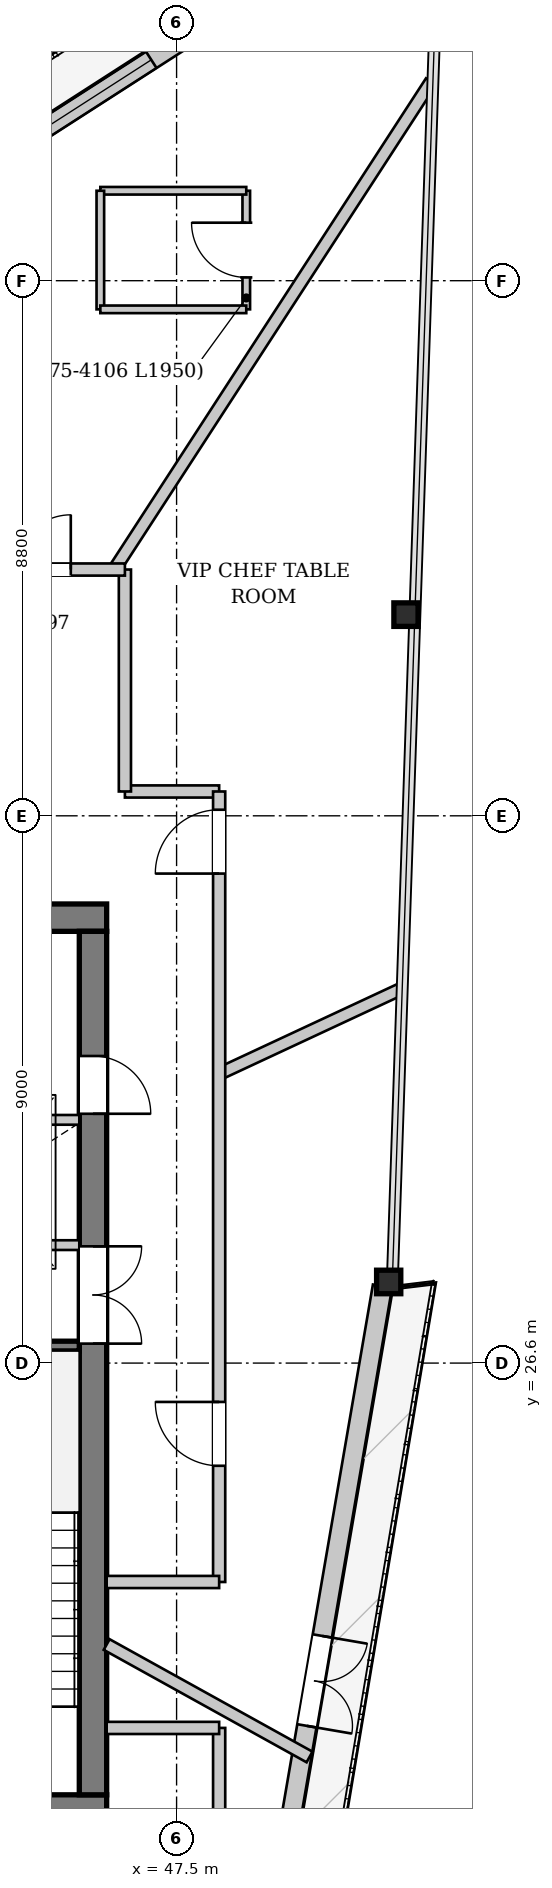
"""IFC4 building model, lengths in metres.
Left out: names, types, materials, properties, quantities, classifications, styles, units other than length and angle.
Written with IfcOpenShell. Run it as: python <this file> out.ifc"""

import sys

from ifc_helpers import new_model, si_unit, direction, frame, frame_2d, origin, origin_2d, place, context, subcontext, project, spatial, rectangle, i_section, extrude, source, transform, mapped, element, fill, save


model = new_model("IFC4")
c1 = context("Model", 3, precision=1e-05, world=origin(), true_north=direction((0.0, 1.0)))
c2 = subcontext(c1, "Body", "Model", "MODEL_VIEW")
j1 = project(units=[si_unit("LENGTHUNIT", "METRE"), si_unit("PLANEANGLEUNIT", "RADIAN")], contexts=[c1])
p1 = place(None, origin())
s1 = spatial("IfcSite", under=j1, at=p1, CompositionType="ELEMENT")
p2 = place(p1, origin())
s2 = spatial("IfcBuilding", under=s1, at=p2, CompositionType="ELEMENT")
p3 = place(p2, frame((0.0, 0.0, 281.9)))
s3 = spatial("IfcBuildingStorey", under=s2, at=p3, CompositionType="ELEMENT", Elevation=281.9)
m1 = source(origin(), c2, "Body", "SweptSolid", [
    extrude(i_section(OverallWidth=0.398, OverallDepth=0.387, WebThickness=0.019, FlangeThickness=0.029, at=origin_2d()), origin(), (0.0, 0.0, 1.0), 3.941),
])
p4 = place(p3, frame((51.044, 27.838, 0.0), z_axis=(-0.028432007479, 0.048811376674, 0.99840326044), x_axis=(-0.864096904342, -0.503325481082, 0.0)))
e1 = element("IfcColumn", 1, at=p4, inside=s3, PredefinedType="COLUMN", context=c2, shape_type="MappedRepresentation", body=[
    mapped(m1, transform((0.0, 0.0, 0.0), x_axis=(1.0, 0.0, 0.0), y_axis=(0.0, 1.0, 0.0), z_axis=(0.0, 0.0, 1.0), scale=1.0)),
])
m2 = source(origin(), c2, "Body", "SweptSolid", [
    extrude(i_section(OverallWidth=0.398, OverallDepth=0.387, WebThickness=0.019, FlangeThickness=0.029, at=origin_2d()), origin(), (0.0, 0.0, 1.0), 3.949),
])
p5 = place(p3, frame((51.417, 38.826, 0.0), z_axis=(-0.072828075966, 0.041730858469, 0.996471076752), x_axis=(-0.497169755353, -0.867653291564, 0.0)))
e2 = element("IfcColumn", 2, at=p5, inside=s3, PredefinedType="COLUMN", context=c2, shape_type="MappedRepresentation", body=[
    mapped(m2, transform((0.0, 0.0, 0.0), x_axis=(1.0, 0.0, 0.0), y_axis=(0.0, 1.0, 0.0), z_axis=(0.0, 0.0, 1.0), scale=1.0)),
])
p6 = place(p3, frame((50.887, 27.865, 0.0), z_axis=(0.0, 0.0, 1.0), x_axis=(-0.169551460744, -0.985521335213, 0.0)))
e3 = element("IfcWall", 3, at=p6, inside=s3, PredefinedType="SOLIDWALL", context=c2, shape_type="SweptSolid", body=[
    extrude(rectangle(XDim=21.989, YDim=0.32, at=frame_2d((10.995, 0.0))), origin(), (0.0, 0.0, 1.0), 3.462),
])
p7 = place(p6, frame((5.837, 0.0, 0.0)))
e4 = element("IfcOpeningElement", 4, at=p7, cuts=e3, PredefinedType="OPENING", context=c2, shape_type="SweptSolid", body=[
    extrude(rectangle(XDim=1.5, YDim=2.3, at=frame_2d((0.75, 1.15))), frame((0.0, 0.17, 0.0), z_axis=(0.0, -1.0, 0.0), x_axis=(1.0, 0.0, 0.0)), (0.0, 0.0, 1.0), 0.34),
])
p8 = place(p6, frame((14.972, 0.0, 0.65)))
e5 = element("IfcOpeningElement", 5, at=p8, cuts=e3, PredefinedType="OPENING", context=c2, shape_type="SweptSolid", body=[
    extrude(rectangle(XDim=2.6, YDim=2.35, at=frame_2d((1.3, 1.175))), frame((0.0, 0.17, 0.0), z_axis=(0.0, -1.0, 0.0), x_axis=(1.0, 0.0, 0.0)), (0.0, 0.0, 1.0), 0.34),
])
p9 = place(p3, frame((32.617, 38.727, 0.0), z_axis=(0.0, 0.0, 1.0), x_axis=(0.841031155516, 0.540986686944, 0.0)))
e6 = element("IfcWall", 6, at=p9, inside=s3, PredefinedType="SOLIDWALL", context=c2, shape_type="SweptSolid", body=[
    extrude(rectangle(XDim=21.489, YDim=0.32, at=frame_2d((10.744, 0.0))), origin(), (0.0, 0.0, 1.0), 3.462),
])
p10 = place(p9, frame((6.876, 0.0, 0.0)))
e7 = element("IfcOpeningElement", 7, at=p10, cuts=e6, PredefinedType="OPENING", context=c2, shape_type="SweptSolid", body=[
    extrude(rectangle(XDim=1.5, YDim=2.3, at=frame_2d((0.75, 1.15))), frame((0.0, 0.17, 0.0), z_axis=(0.0, -1.0, 0.0), x_axis=(1.0, 0.0, 0.0)), (0.0, 0.0, 1.0), 0.34),
])
p11 = place(p9, frame((14.601, 0.0, 0.65)))
e8 = element("IfcOpeningElement", 8, at=p11, cuts=e6, PredefinedType="OPENING", context=c2, shape_type="SweptSolid", body=[
    extrude(rectangle(XDim=2.6, YDim=2.35, at=frame_2d((1.3, 1.175))), frame((0.0, 0.17, 0.0), z_axis=(0.0, -1.0, 0.0), x_axis=(1.0, 0.0, 0.0)), (0.0, 0.0, 1.0), 0.34),
])
p12 = place(p3, frame((46.35, 19.275, 0.0), z_axis=(0.0, 0.0, 1.0), x_axis=(-1.0, 0.0, 0.0)))
e9 = element("IfcWall", 9, at=p12, inside=s3, PredefinedType="SHEAR", context=c2, shape_type="SweptSolid", body=[
    extrude(rectangle(XDim=16.7, YDim=0.45, at=frame_2d((8.35, 0.0))), origin(), (0.0, 0.0, 1.0), 3.92),
])
p13 = place(p12, frame((4.55, 0.0, 0.0)))
e10 = element("IfcOpeningElement", 10, at=p13, cuts=e9, PredefinedType="OPENING", context=c2, shape_type="SweptSolid", body=[
    extrude(rectangle(XDim=1.12, YDim=2.25, at=frame_2d((0.56, 1.125))), frame((0.0, 0.235, 0.0), z_axis=(0.0, -1.0, 0.0), x_axis=(1.0, 0.0, 0.0)), (0.0, 0.0, 1.0), 0.47),
])
p14 = place(p12, frame((11.05, 0.0, 0.0)))
e11 = element("IfcOpeningElement", 11, at=p14, cuts=e9, PredefinedType="OPENING", context=c2, shape_type="SweptSolid", body=[
    extrude(rectangle(XDim=1.12, YDim=2.25, at=frame_2d((0.56, 1.125))), frame((0.0, 0.235, 0.0), z_axis=(0.0, -1.0, 0.0), x_axis=(1.0, 0.0, 0.0)), (0.0, 0.0, 1.0), 0.47),
])
p15 = place(p3, frame((29.65, 33.925, 0.0), z_axis=(0.0, 0.0, 1.0), x_axis=(1.0, 0.0, 0.0)))
e12 = element("IfcWall", 12, at=p15, inside=s3, PredefinedType="SHEAR", context=c2, shape_type="SweptSolid", body=[
    extrude(rectangle(XDim=16.7, YDim=0.45, at=frame_2d((8.35, 0.0))), origin(), (0.0, 0.0, 1.0), 3.92),
])
p16 = place(p15, frame((1.45, 0.0, 0.0)))
e13 = element("IfcOpeningElement", 13, at=p16, cuts=e12, PredefinedType="OPENING", context=c2, shape_type="SweptSolid", body=[
    extrude(rectangle(XDim=0.95, YDim=2.1, at=frame_2d((0.475, 1.05))), frame((0.0, 0.235, 0.0), z_axis=(0.0, -1.0, 0.0), x_axis=(1.0, 0.0, 0.0)), (0.0, 0.0, 1.0), 0.47),
])
p17 = place(p15, frame((3.83, 0.0, 0.0)))
e14 = element("IfcOpeningElement", 14, at=p17, cuts=e12, PredefinedType="OPENING", context=c2, shape_type="SweptSolid", body=[
    extrude(rectangle(XDim=1.32, YDim=2.2, at=frame_2d((0.66, 1.1))), frame((0.0, 0.235, 0.0), z_axis=(0.0, -1.0, 0.0), x_axis=(1.0, 0.0, 0.0)), (0.0, 0.0, 1.0), 0.47),
])
p18 = place(p3, frame((46.125, 33.7, 0.0), z_axis=(0.0, 0.0, 1.0), x_axis=(0.0, -1.0, 0.0)))
e15 = element("IfcWall", 15, at=p18, inside=s3, PredefinedType="SHEAR", context=c2, shape_type="SweptSolid", body=[
    extrude(rectangle(XDim=14.2, YDim=0.45, at=frame_2d((7.1, 0.0))), origin(), (0.0, 0.0, 1.0), 3.92),
])
p19 = place(p18, frame((5.18, 0.0, 0.0)))
e16 = element("IfcOpeningElement", 16, at=p19, cuts=e15, PredefinedType="OPENING", context=c2, shape_type="SweptSolid", body=[
    extrude(rectangle(XDim=1.6, YDim=2.2, at=frame_2d((0.8, 1.1))), frame((0.0, 0.235, 0.0), z_axis=(0.0, -1.0, 0.0), x_axis=(1.0, 0.0, 0.0)), (0.0, 0.0, 1.0), 0.47),
])
p20 = place(p18, frame((2.05, 0.0, 0.0)))
e17 = element("IfcOpeningElement", 17, at=p20, cuts=e15, PredefinedType="OPENING", context=c2, shape_type="SweptSolid", body=[
    extrude(rectangle(XDim=0.95, YDim=2.1, at=frame_2d((0.475, 1.05))), frame((0.0, 0.235, 0.0), z_axis=(0.0, -1.0, 0.0), x_axis=(1.0, 0.0, 0.0)), (0.0, 0.0, 1.0), 0.47),
])
p21 = place(p3, frame((42.88, 26.88, 0.0), z_axis=(0.0, 0.0, 1.0), x_axis=(1.0, 0.0, 0.0)))
e18 = element("IfcWall", 18, at=p21, inside=s3, PredefinedType="PARTITIONING", context=c2, shape_type="SweptSolid", body=[
    extrude(rectangle(XDim=3.02, YDim=0.16, at=frame_2d((1.51, 0.0))), origin(), (0.0, 0.0, 1.0), 3.92),
])
p22 = place(p3, frame((33.28, 28.54, 0.0), z_axis=(0.0, 0.0, 1.0), x_axis=(1.0, 0.0, 0.0)))
e19 = element("IfcWall", 19, at=p22, inside=s3, PredefinedType="PARTITIONING", context=c2, shape_type="SweptSolid", body=[
    extrude(rectangle(XDim=12.62, YDim=0.16, at=frame_2d((6.31, 0.0))), origin(), (0.0, 0.0, 1.0), 3.92),
])
p23 = place(p22, frame((0.8, 0.0, 0.0)))
e20 = element("IfcOpeningElement", 20, at=p23, cuts=e19, PredefinedType="OPENING", context=c2, shape_type="SweptSolid", body=[
    extrude(rectangle(XDim=0.95, YDim=2.1, at=frame_2d((0.475, 1.05))), frame((0.0, 0.09, 0.0), z_axis=(0.0, -1.0, 0.0), x_axis=(1.0, 0.0, 0.0)), (0.0, 0.0, 1.0), 0.18),
])
p24 = place(p22, frame((3.3, 0.0, 0.0)))
e21 = element("IfcOpeningElement", 21, at=p24, cuts=e19, PredefinedType="OPENING", context=c2, shape_type="SweptSolid", body=[
    extrude(rectangle(XDim=0.95, YDim=2.1, at=frame_2d((0.475, 1.05))), frame((0.0, 0.09, 0.0), z_axis=(0.0, -1.0, 0.0), x_axis=(1.0, 0.0, 0.0)), (0.0, 0.0, 1.0), 0.18),
])
p25 = place(p22, frame((5.63, 0.0, 0.0)))
e22 = element("IfcOpeningElement", 22, at=p25, cuts=e19, PredefinedType="OPENING", context=c2, shape_type="SweptSolid", body=[
    extrude(rectangle(XDim=1.1, YDim=2.2, at=frame_2d((0.55, 1.1))), frame((0.0, 0.09, 0.0), z_axis=(0.0, -1.0, 0.0), x_axis=(1.0, 0.0, 0.0)), (0.0, 0.0, 1.0), 0.18),
])
p26 = place(p22, frame((7.76, 0.0, 0.0)))
e23 = element("IfcOpeningElement", 23, at=p26, cuts=e19, PredefinedType="OPENING", context=c2, shape_type="SweptSolid", body=[
    extrude(rectangle(XDim=1.1, YDim=2.2, at=frame_2d((0.55, 1.1))), frame((0.0, 0.09, 0.0), z_axis=(0.0, -1.0, 0.0), x_axis=(1.0, 0.0, 0.0)), (0.0, 0.0, 1.0), 0.18),
])
p27 = place(p22, frame((10.56, 0.0, 0.0)))
e24 = element("IfcOpeningElement", 24, at=p27, cuts=e19, PredefinedType="OPENING", context=c2, shape_type="SweptSolid", body=[
    extrude(rectangle(XDim=1.1, YDim=2.2, at=frame_2d((0.55, 1.1))), frame((0.0, 0.09, 0.0), z_axis=(0.0, -1.0, 0.0), x_axis=(1.0, 0.0, 0.0)), (0.0, 0.0, 1.0), 0.18),
])
p28 = place(p3, frame((40.72, 30.6, 0.0), z_axis=(0.0, 0.0, 1.0), x_axis=(1.0, 0.0, 0.0)))
e25 = element("IfcWall", 25, at=p28, inside=s3, PredefinedType="PARTITIONING", context=c2, shape_type="SweptSolid", body=[
    extrude(rectangle(XDim=5.18, YDim=0.16, at=frame_2d((2.59, 0.0))), origin(), (0.0, 0.0, 1.0), 3.92),
])
p29 = place(p3, frame((46.35, 21.971, 0.0), z_axis=(0.0, 0.0, 1.0), x_axis=(0.874624795307, -0.484800440835, 0.0)))
e26 = element("IfcWall", 26, at=p29, inside=s3, PredefinedType="PARTITIONING", context=c2, shape_type="SweptSolid", body=[
    extrude(rectangle(XDim=3.815, YDim=0.2, at=frame_2d((1.907, 0.0))), origin(), (0.0, 0.0, 1.0), 3.92),
])
p30 = place(p3, frame((48.2, 31.356, 0.0), z_axis=(0.0, 0.0, 1.0), x_axis=(0.906312057572, 0.422609103428, 0.0)))
e27 = element("IfcWall", 27, at=p30, inside=s3, PredefinedType="PARTITIONING", context=c2, shape_type="SweptSolid", body=[
    extrude(rectangle(XDim=3.289, YDim=0.2, at=frame_2d((1.645, 0.0))), origin(), (0.0, 0.0, 1.0), 3.92),
])
p31 = place(p3, frame((46.475, 39.65, 0.0), z_axis=(0.0, 0.0, 1.0), x_axis=(0.54461430033, 0.838686630319, 0.0)))
e28 = element("IfcWall", 28, at=p31, inside=s3, PredefinedType="PARTITIONING", context=c2, shape_type="SweptSolid", body=[
    extrude(rectangle(XDim=9.568, YDim=0.2, at=frame_2d((4.784, 0.0))), origin(), (0.0, 0.0, 1.0), 3.455),
])
p32 = place(p3, frame((48.646, 43.929, 0.0), z_axis=(0.0, 0.0, 1.0), x_axis=(0.0, 1.0, 0.0)))
e29 = element("IfcWall", 29, at=p32, inside=s3, PredefinedType="PARTITIONING", context=c2, shape_type="SweptSolid", body=[
    extrude(rectangle(XDim=1.95, YDim=0.125, at=frame_2d((0.975, 0.0))), origin(), (0.0, 0.0, 1.0), 3.595),
])
p33 = place(p32, frame((0.525, 0.0, 0.0)))
e30 = element("IfcOpeningElement", 30, at=p33, cuts=e29, PredefinedType="OPENING", context=c2, shape_type="SweptSolid", body=[
    extrude(rectangle(XDim=0.9, YDim=2.1, at=frame_2d((0.45, 1.05))), frame((0.0, 0.073, 0.0), z_axis=(0.0, -1.0, 0.0), x_axis=(1.0, 0.0, 0.0)), (0.0, 0.0, 1.0), 0.145),
])
p34 = place(p3, frame((48.646, 45.879, 0.0), z_axis=(0.0, 0.0, 1.0), x_axis=(-1.0, 0.0, 0.0)))
e31 = element("IfcWall", 31, at=p34, inside=s3, PredefinedType="PARTITIONING", context=c2, shape_type="SweptSolid", body=[
    extrude(rectangle(XDim=2.4, YDim=0.125, at=frame_2d((1.2, 0.0))), origin(), (0.0, 0.0, 1.0), 3.92),
])
p35 = place(p3, frame((46.246, 45.879, 0.0), z_axis=(0.0, 0.0, 1.0), x_axis=(0.0, -1.0, 0.0)))
e32 = element("IfcWall", 32, at=p35, inside=s3, PredefinedType="PARTITIONING", context=c2, shape_type="SweptSolid", body=[
    extrude(rectangle(XDim=1.95, YDim=0.125, at=frame_2d((0.975, 0.0))), origin(), (0.0, 0.0, 1.0), 3.92),
])
p36 = place(p3, frame((46.246, 43.929, 0.0), z_axis=(0.0, 0.0, 1.0), x_axis=(1.0, 0.0, 0.0)))
e33 = element("IfcWall", 33, at=p36, inside=s3, PredefinedType="PARTITIONING", context=c2, shape_type="SweptSolid", body=[
    extrude(rectangle(XDim=2.4, YDim=0.125, at=frame_2d((1.2, 0.0))), origin(), (0.0, 0.0, 1.0), 3.545),
])
p37 = place(p3, frame((46.65, 36.0, 0.0), z_axis=(0.0, 0.0, 1.0), x_axis=(1.0, 0.0, 0.0)))
e34 = element("IfcWall", 34, at=p37, inside=s3, PredefinedType="PARTITIONING", context=c2, shape_type="SweptSolid", body=[
    extrude(rectangle(XDim=1.55, YDim=0.2, at=frame_2d((0.775, 0.0))), origin(), (0.0, 0.0, 1.0), 3.92),
])
p38 = place(p3, frame((48.2, 17.2, 0.0), z_axis=(0.0, 0.0, 1.0), x_axis=(0.0, 1.0, 0.0)))
e35 = element("IfcWall", 35, at=p38, inside=s3, PredefinedType="PARTITIONING", context=c2, shape_type="SweptSolid", body=[
    extrude(rectangle(XDim=3.4, YDim=0.2, at=frame_2d((1.7, 0.0))), origin(), (0.0, 0.0, 1.0), 3.92),
])
p39 = place(p3, frame((46.35, 20.6, 0.0), z_axis=(0.0, 0.0, 1.0), x_axis=(1.0, 0.0, 0.0)))
e36 = element("IfcWall", 36, at=p39, inside=s3, PredefinedType="PARTITIONING", context=c2, shape_type="SweptSolid", body=[
    extrude(rectangle(XDim=1.85, YDim=0.2, at=frame_2d((0.925, 0.0))), origin(), (0.0, 0.0, 1.0), 3.92),
])
p40 = place(p3, frame((48.2, 23.0, 0.0), z_axis=(0.0, 0.0, 1.0), x_axis=(0.0, 1.0, 0.0)))
e37 = element("IfcWall", 37, at=p40, inside=s3, PredefinedType="PARTITIONING", context=c2, shape_type="SweptSolid", body=[
    extrude(rectangle(XDim=13.0, YDim=0.2, at=frame_2d((6.5, 0.0))), origin(), (0.0, 0.0, 1.0), 3.665),
])
p41 = place(p40, frame((1.911, 0.0, 0.0)))
e38 = element("IfcOpeningElement", 38, at=p41, cuts=e37, PredefinedType="OPENING", context=c2, shape_type="SweptSolid", body=[
    extrude(rectangle(XDim=1.05, YDim=2.2, at=frame_2d((0.525, 1.1))), frame((0.0, 0.11, 0.0), z_axis=(0.0, -1.0, 0.0), x_axis=(1.0, 0.0, 0.0)), (0.0, 0.0, 1.0), 0.22),
])
p42 = place(p40, frame((11.65, 0.0, 0.0)))
e39 = element("IfcOpeningElement", 39, at=p42, cuts=e37, PredefinedType="OPENING", context=c2, shape_type="SweptSolid", body=[
    extrude(rectangle(XDim=1.05, YDim=2.2, at=frame_2d((0.525, 1.1))), frame((0.0, 0.11, 0.0), z_axis=(0.0, -1.0, 0.0), x_axis=(1.0, 0.0, 0.0)), (0.0, 0.0, 1.0), 0.22),
])
p43 = place(p3, frame((46.35, 23.0, 0.0), z_axis=(0.0, 0.0, 1.0), x_axis=(1.0, 0.0, 0.0)))
e40 = element("IfcWall", 40, at=p43, inside=s3, PredefinedType="PARTITIONING", context=c2, shape_type="SweptSolid", body=[
    extrude(rectangle(XDim=1.85, YDim=0.2, at=frame_2d((0.925, 0.0))), origin(), (0.0, 0.0, 1.0), 3.92),
])
p44 = place(p3, frame((46.65, 36.0, 0.0), z_axis=(0.0, 0.0, 1.0), x_axis=(0.0, 1.0, 0.0)))
e41 = element("IfcWall", 41, at=p44, inside=s3, PredefinedType="PARTITIONING", context=c2, shape_type="SweptSolid", body=[
    extrude(rectangle(XDim=3.65, YDim=0.2, at=frame_2d((1.825, 0.0))), origin(), (0.0, 0.0, 1.0), 3.92),
])
p45 = place(p3, frame((36.55, 39.65, 0.0), z_axis=(0.0, 0.0, 1.0), x_axis=(1.0, 0.0, 0.0)))
e42 = element("IfcWall", 42, at=p45, inside=s3, PredefinedType="PARTITIONING", context=c2, shape_type="SweptSolid", body=[
    extrude(rectangle(XDim=10.1, YDim=0.2, at=frame_2d((5.05, 0.0))), origin(), (0.0, 0.0, 1.0), 3.545),
])
p46 = place(p45, frame((8.31, 0.0, 0.0)))
e43 = element("IfcOpeningElement", 43, at=p46, cuts=e42, PredefinedType="OPENING", context=c2, shape_type="SweptSolid", body=[
    extrude(rectangle(XDim=0.9, YDim=2.1, at=frame_2d((0.45, 1.05))), frame((0.0, 0.11, 0.0), z_axis=(0.0, -1.0, 0.0), x_axis=(1.0, 0.0, 0.0)), (0.0, 0.0, 1.0), 0.22),
])
m3 = source(origin(), c2, "Body", "SweptSolid", [
    extrude(rectangle(XDim=1.5, YDim=2.3, at=frame_2d((0.75, 1.15))), frame((0.0, 0.025, 0.0), z_axis=(0.0, -1.0, 0.0), x_axis=(1.0, 0.0, 0.0)), (0.0, 0.0, 1.0), 0.05),
])
p47 = place(p7, origin())
e44 = element("IfcDoor", 44, at=p47, inside=s3, OperationType="DOUBLE_DOOR_SINGLE_SWING", PredefinedType="DOOR", context=c2, shape_type="MappedRepresentation", body=[
    mapped(m3, transform((0.0, 0.0, 0.0), x_axis=(1.0, 0.0, 0.0), y_axis=(0.0, 1.0, 0.0), z_axis=(0.0, 0.0, 1.0), scale=1.0)),
])
fill(e4, e44)
m4 = source(origin(), c2, "Body", "SweptSolid", [
    extrude(rectangle(XDim=2.6, YDim=2.35, at=frame_2d((1.3, 1.175))), frame((0.0, 0.03, 0.0), z_axis=(0.0, -1.0, 0.0), x_axis=(1.0, 0.0, 0.0)), (0.0, 0.0, 1.0), 0.06),
])
p48 = place(p11, origin())
e45 = element("IfcWindow", 45, at=p48, inside=s3, PartitioningType="SINGLE_PANEL", PredefinedType="WINDOW", context=c2, shape_type="MappedRepresentation", body=[
    mapped(m4, transform((0.0, 0.0, 0.0), x_axis=(1.0, 0.0, 0.0), y_axis=(0.0, 1.0, 0.0), z_axis=(0.0, 0.0, 1.0), scale=1.0)),
])
fill(e8, e45)
m5 = source(origin(), c2, "Body", "SweptSolid", [
    extrude(rectangle(XDim=1.6, YDim=2.2, at=frame_2d((0.8, 1.1))), frame((0.0, 0.025, 0.0), z_axis=(0.0, -1.0, 0.0), x_axis=(1.0, 0.0, 0.0)), (0.0, 0.0, 1.0), 0.05),
])
p49 = place(p19, origin())
e46 = element("IfcDoor", 46, at=p49, inside=s3, OperationType="DOUBLE_DOOR_SINGLE_SWING", PredefinedType="DOOR", context=c2, shape_type="MappedRepresentation", body=[
    mapped(m5, transform((0.0, 0.0, 0.0), x_axis=(1.0, 0.0, 0.0), y_axis=(0.0, 1.0, 0.0), z_axis=(0.0, 0.0, 1.0), scale=1.0)),
])
fill(e16, e46)
m6 = source(origin(), c2, "Body", "SweptSolid", [
    extrude(rectangle(XDim=0.95, YDim=2.1, at=frame_2d((0.475, 1.05))), frame((0.0, 0.025, 0.0), z_axis=(0.0, -1.0, 0.0), x_axis=(1.0, 0.0, 0.0)), (0.0, 0.0, 1.0), 0.05),
])
p50 = place(p20, origin())
e47 = element("IfcDoor", 47, at=p50, inside=s3, OperationType="SINGLE_SWING_RIGHT", PredefinedType="DOOR", context=c2, shape_type="MappedRepresentation", body=[
    mapped(m6, transform((0.0, 0.0, 0.0), x_axis=(1.0, 0.0, 0.0), y_axis=(0.0, 1.0, 0.0), z_axis=(0.0, 0.0, 1.0), scale=1.0)),
])
fill(e17, e47)
m7 = source(origin(), c2, "Body", "SweptSolid", [
    extrude(rectangle(XDim=0.9, YDim=2.1, at=frame_2d((0.45, 1.05))), frame((0.0, 0.025, 0.0), z_axis=(0.0, -1.0, 0.0), x_axis=(1.0, 0.0, 0.0)), (0.0, 0.0, 1.0), 0.05),
])
p51 = place(p33, origin())
e48 = element("IfcDoor", 48, at=p51, inside=s3, OperationType="SINGLE_SWING_RIGHT", PredefinedType="DOOR", context=c2, shape_type="MappedRepresentation", body=[
    mapped(m7, transform((0.0, 0.0, 0.0), x_axis=(1.0, 0.0, 0.0), y_axis=(0.0, 1.0, 0.0), z_axis=(0.0, 0.0, 1.0), scale=1.0)),
])
fill(e30, e48)
m8 = source(origin(), c2, "Body", "SweptSolid", [
    extrude(rectangle(XDim=1.05, YDim=2.2, at=frame_2d((0.525, 1.1))), frame((0.0, 0.025, 0.0), z_axis=(0.0, -1.0, 0.0), x_axis=(1.0, 0.0, 0.0)), (0.0, 0.0, 1.0), 0.05),
])
p52 = place(p41, origin())
e49 = element("IfcDoor", 49, at=p52, inside=s3, OperationType="SINGLE_SWING_RIGHT", PredefinedType="DOOR", context=c2, shape_type="MappedRepresentation", body=[
    mapped(m8, transform((0.0, 0.0, 0.0), x_axis=(1.0, 0.0, 0.0), y_axis=(0.0, 1.0, 0.0), z_axis=(0.0, 0.0, 1.0), scale=1.0)),
])
fill(e38, e49)
p53 = place(p42, origin())
e50 = element("IfcDoor", 50, at=p53, inside=s3, OperationType="SINGLE_SWING_LEFT", PredefinedType="DOOR", context=c2, shape_type="MappedRepresentation", body=[
    mapped(m8, transform((0.0, 0.0, 0.0), x_axis=(1.0, 0.0, 0.0), y_axis=(0.0, 1.0, 0.0), z_axis=(0.0, 0.0, 1.0), scale=1.0)),
])
fill(e39, e50)
p54 = place(p46, origin())
e51 = element("IfcDoor", 51, at=p54, inside=s3, OperationType="SINGLE_SWING_RIGHT", PredefinedType="DOOR", context=c2, shape_type="MappedRepresentation", body=[
    mapped(m7, transform((0.0, 0.0, 0.0), x_axis=(1.0, 0.0, 0.0), y_axis=(0.0, 1.0, 0.0), z_axis=(0.0, 0.0, 1.0), scale=1.0)),
])
fill(e43, e51)
save(model, sys.argv[1])
